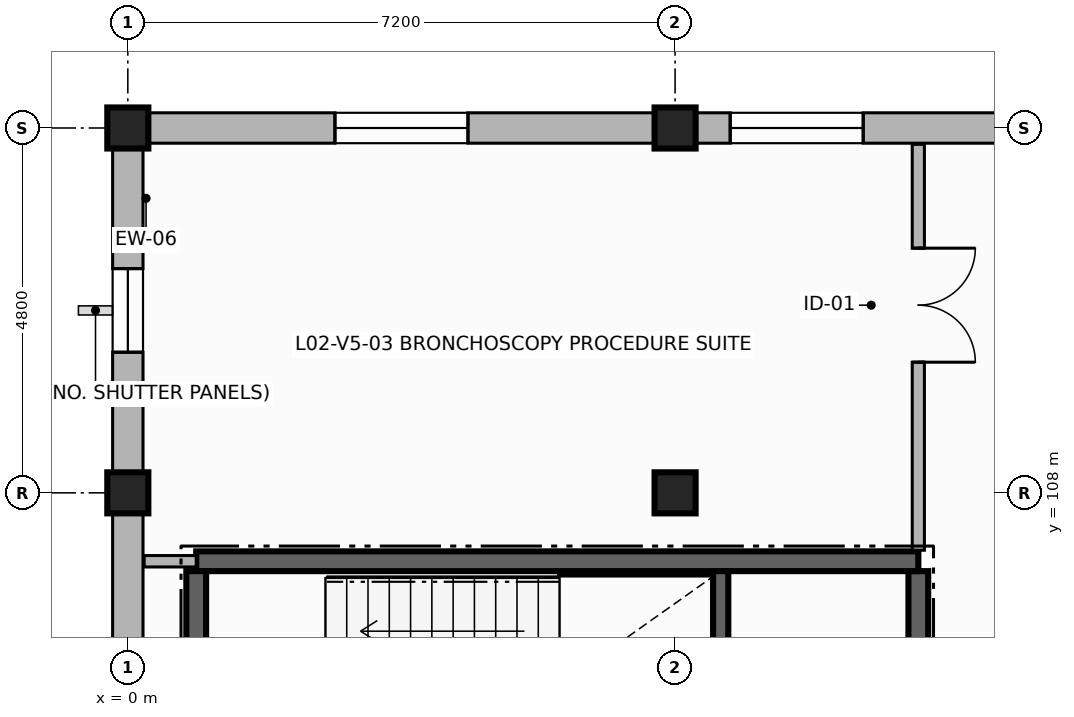
"""IFC4 building model, lengths in metres.
Left out: names, types, materials, properties, quantities, classifications, styles, units other than length and angle.
Written with IfcOpenShell. Run it as: python <this file> out.ifc"""

import sys

from ifc_helpers import new_model, si_unit, direction, frame, frame_2d, origin, origin_2d, place, context, subcontext, project, spatial, rectangle, extrude, element, fill, save


model = new_model("IFC4")
c1 = context("Model", 3, precision=1e-05, world=origin(), true_north=direction((0.0, 1.0)))
c2 = subcontext(c1, "Body", "Model", "MODEL_VIEW")
j1 = project(units=[si_unit("LENGTHUNIT", "METRE"), si_unit("PLANEANGLEUNIT", "RADIAN")], contexts=[c1])
p1 = place(None, origin())
s1 = spatial("IfcSite", under=j1, at=p1, CompositionType="ELEMENT")
p2 = place(p1, origin())
s2 = spatial("IfcBuilding", under=s1, at=p2, CompositionType="ELEMENT")
p3 = place(p2, frame((0.0, 0.0, 8.4)))
s3 = spatial("IfcBuildingStorey", under=s2, at=p3, CompositionType="ELEMENT", Elevation=8.4)
for number, where, z_axis, x_axis in (
    (1, (0.0, 108.0, 0.0), (0.0, 0.0, 1.0), (1.0, 0.0, 0.0)),
    (2, (0.0, 112.8, 0.0), (0.0, 0.0, 1.0), (1.0, 0.0, 0.0)),
    (3, (7.2, 108.0, 0.0), (0.0, 0.0, 1.0), (1.0, 0.0, 0.0)),
    (4, (7.2, 112.8, 0.0), (0.0, 0.0, 1.0), (1.0, 0.0, 0.0)),
):
    element("IfcColumn", number, at=place(p3, frame(where, z_axis=z_axis, x_axis=x_axis)), inside=s3, PredefinedType="COLUMN", context=c2, shape_type="SweptSolid", body=[
        extrude(rectangle(XDim=0.54, YDim=0.54, at=origin_2d()), origin(), (0.0, 0.0, 1.0), 3.59),
    ])
p4 = place(p3, frame((14.4, 112.8, 0.0), z_axis=(0.0, 0.0, 1.0), x_axis=(-1.0, 0.0, 0.0)))
e5 = element("IfcWall", 5, at=p4, inside=s3, PredefinedType="SOLIDWALL", context=c2, shape_type="SweptSolid", body=[
    extrude(rectangle(XDim=7.2, YDim=0.4, at=frame_2d((3.6, 0.0))), origin(), (0.0, 0.0, 1.0), 2.92),
])
p5 = place(p4, frame((4.725, 0.0, 0.9)))
e6 = element("IfcOpeningElement", 6, at=p5, cuts=e5, PredefinedType="OPENING", context=c2, shape_type="SweptSolid", body=[
    extrude(rectangle(XDim=1.75, YDim=1.8, at=frame_2d((0.875, 0.9))), frame((0.0, 0.21, 0.0), z_axis=(0.0, -1.0, 0.0), x_axis=(1.0, 0.0, 0.0)), (0.0, 0.0, 1.0), 0.42),
])
p6 = place(p3, frame((7.2, 112.8, 0.0), z_axis=(0.0, 0.0, 1.0), x_axis=(-1.0, 0.0, 0.0)))
e7 = element("IfcWall", 7, at=p6, inside=s3, PredefinedType="SOLIDWALL", context=c2, shape_type="SweptSolid", body=[
    extrude(rectangle(XDim=7.2, YDim=0.4, at=frame_2d((3.6, 0.0))), origin(), (0.0, 0.0, 1.0), 2.92),
])
p7 = place(p6, frame((2.725, 0.0, 0.9)))
e8 = element("IfcOpeningElement", 8, at=p7, cuts=e7, PredefinedType="OPENING", context=c2, shape_type="SweptSolid", body=[
    extrude(rectangle(XDim=1.75, YDim=1.8, at=frame_2d((0.875, 0.9))), frame((0.0, 0.21, 0.0), z_axis=(0.0, -1.0, 0.0), x_axis=(1.0, 0.0, 0.0)), (0.0, 0.0, 1.0), 0.42),
])
p8 = place(p3, frame((0.0, 112.8, 0.0), z_axis=(0.0, 0.0, 1.0), x_axis=(0.0, -1.0, 0.0)))
e9 = element("IfcWall", 9, at=p8, inside=s3, PredefinedType="SOLIDWALL", context=c2, shape_type="SweptSolid", body=[
    extrude(rectangle(XDim=4.8, YDim=0.4, at=frame_2d((2.4, 0.0))), origin(), (0.0, 0.0, 1.0), 2.92),
])
p9 = place(p8, frame((1.85, 0.0, 0.85)))
e10 = element("IfcOpeningElement", 10, at=p9, cuts=e9, PredefinedType="OPENING", context=c2, shape_type="SweptSolid", body=[
    extrude(rectangle(XDim=1.1, YDim=1.85, at=frame_2d((0.55, 0.925))), frame((0.0, 0.21, 0.0), z_axis=(0.0, -1.0, 0.0), x_axis=(1.0, 0.0, 0.0)), (0.0, 0.0, 1.0), 0.42),
])
p10 = place(p3, frame((0.0, 108.0, 0.0), z_axis=(0.0, 0.0, 1.0), x_axis=(0.0, -1.0, 0.0)))
e11 = element("IfcWall", 11, at=p10, inside=s3, PredefinedType="SOLIDWALL", context=c2, shape_type="SweptSolid", body=[
    extrude(rectangle(XDim=7.2, YDim=0.4, at=frame_2d((3.6, 0.0))), origin(), (0.0, 0.0, 1.0), 2.92),
])
p11 = place(p10, frame((3.025, 0.0, 0.9)))
e12 = element("IfcOpeningElement", 12, at=p11, cuts=e11, PredefinedType="OPENING", context=c2, shape_type="SweptSolid", body=[
    extrude(rectangle(XDim=1.55, YDim=1.8, at=frame_2d((0.775, 0.9))), frame((0.0, 0.21, 0.0), z_axis=(0.0, -1.0, 0.0), x_axis=(1.0, 0.0, 0.0)), (0.0, 0.0, 1.0), 0.42),
])
p12 = place(p3, frame((10.4, 101.43, 0.0), z_axis=(0.0, 0.0, 1.0), x_axis=(0.0, 1.0, 0.0)))
e13 = element("IfcWall", 13, at=p12, inside=s3, PredefinedType="SHEAR", context=c2, shape_type="SweptSolid", body=[
    extrude(rectangle(XDim=5.54, YDim=0.26, at=frame_2d((2.77, 0.0))), origin(), (0.0, 0.0, 1.0), 3.59),
])
p13 = place(p12, frame((0.32, 0.0, 0.0)))
e14 = element("IfcOpeningElement", 14, at=p13, cuts=e13, PredefinedType="OPENING", context=c2, shape_type="SweptSolid", body=[
    extrude(rectangle(XDim=1.15, YDim=2.2, at=frame_2d((0.575, 1.1))), frame((0.0, 0.14, 0.0), z_axis=(0.0, -1.0, 0.0), x_axis=(1.0, 0.0, 0.0)), (0.0, 0.0, 1.0), 0.28),
])
p14 = place(p3, frame((10.4, 107.1, 0.0), z_axis=(0.0, 0.0, 1.0), x_axis=(-1.0, 0.0, 0.0)))
e15 = element("IfcWall", 15, at=p14, inside=s3, PredefinedType="SHEAR", context=c2, shape_type="SweptSolid", body=[
    extrude(rectangle(XDim=9.5, YDim=0.26, at=frame_2d((4.75, 0.0))), origin(), (0.0, 0.0, 1.0), 3.59),
])
p15 = place(p3, frame((0.9, 106.97, 0.0), z_axis=(0.0, 0.0, 1.0), x_axis=(0.0, -1.0, 0.0)))
e16 = element("IfcWall", 16, at=p15, inside=s3, PredefinedType="SHEAR", context=c2, shape_type="SweptSolid", body=[
    extrude(rectangle(XDim=5.54, YDim=0.26, at=frame_2d((2.77, 0.0))), origin(), (0.0, 0.0, 1.0), 3.59),
])
p16 = place(p3, frame((7.8, 103.3, 0.0), z_axis=(0.0, 0.0, 1.0), x_axis=(0.0, 1.0, 0.0)))
e17 = element("IfcWall", 17, at=p16, inside=s3, PredefinedType="SHEAR", context=c2, shape_type="SweptSolid", body=[
    extrude(rectangle(XDim=3.67, YDim=0.2, at=frame_2d((1.835, 0.0))), origin(), (0.0, 0.0, 1.0), 3.59),
])
p17 = place(p3, frame((10.4, 112.585, 0.0), z_axis=(0.0, 0.0, 1.0), x_axis=(0.0, -1.0, 0.0)))
e18 = element("IfcWall", 18, at=p17, inside=s3, PredefinedType="PARTITIONING", context=c2, shape_type="SweptSolid", body=[
    extrude(rectangle(XDim=5.34, YDim=0.16, at=frame_2d((2.67, 0.0))), origin(), (0.0, 0.0, 1.0), 2.9),
])
p18 = place(p17, frame((1.366, 0.0, 0.0)))
e19 = element("IfcOpeningElement", 19, at=p18, cuts=e18, PredefinedType="OPENING", context=c2, shape_type="SweptSolid", body=[
    extrude(rectangle(XDim=1.5, YDim=2.3, at=frame_2d((0.75, 1.15))), frame((0.0, 0.09, 0.0), z_axis=(0.0, -1.0, 0.0), x_axis=(1.0, 0.0, 0.0)), (0.0, 0.0, 1.0), 0.18),
])
p19 = place(p3, frame((0.9, 107.1, 0.0), z_axis=(0.0, 0.0, 1.0), x_axis=(-1.0, 0.0, 0.0)))
e20 = element("IfcWall", 20, at=p19, inside=s3, PredefinedType="PARTITIONING", context=c2, shape_type="SweptSolid", body=[
    extrude(rectangle(XDim=0.685, YDim=0.15, at=frame_2d((0.342, 0.0))), origin(), (0.0, 0.0, 1.0), 2.9),
])
p20 = place(p5, origin())
e21 = element("IfcWindow", 21, at=p20, inside=s3, PartitioningType="SINGLE_PANEL", PredefinedType="WINDOW", context=c2, shape_type="SweptSolid", body=[
    extrude(rectangle(XDim=1.75, YDim=1.8, at=frame_2d((0.875, 0.9))), frame((0.0, 0.03, 0.0), z_axis=(0.0, -1.0, 0.0), x_axis=(1.0, 0.0, 0.0)), (0.0, 0.0, 1.0), 0.06),
])
fill(e6, e21)
p21 = place(p7, origin())
e22 = element("IfcWindow", 22, at=p21, inside=s3, PartitioningType="SINGLE_PANEL", PredefinedType="WINDOW", context=c2, shape_type="SweptSolid", body=[
    extrude(rectangle(XDim=1.75, YDim=1.8, at=frame_2d((0.875, 0.9))), frame((0.0, 0.03, 0.0), z_axis=(0.0, -1.0, 0.0), x_axis=(1.0, 0.0, 0.0)), (0.0, 0.0, 1.0), 0.06),
])
fill(e8, e22)
p22 = place(p9, origin())
e23 = element("IfcWindow", 23, at=p22, inside=s3, PartitioningType="SINGLE_PANEL", PredefinedType="WINDOW", context=c2, shape_type="SweptSolid", body=[
    extrude(rectangle(XDim=1.1, YDim=1.85, at=frame_2d((0.55, 0.925))), frame((0.0, 0.03, 0.0), z_axis=(0.0, -1.0, 0.0), x_axis=(1.0, 0.0, 0.0)), (0.0, 0.0, 1.0), 0.06),
])
fill(e10, e23)
p23 = place(p18, origin())
e24 = element("IfcDoor", 24, at=p23, inside=s3, OperationType="DOUBLE_DOOR_SINGLE_SWING", PredefinedType="DOOR", context=c2, shape_type="SweptSolid", body=[
    extrude(rectangle(XDim=1.5, YDim=2.3, at=frame_2d((0.75, 1.15))), frame((0.0, 0.025, 0.0), z_axis=(0.0, -1.0, 0.0), x_axis=(1.0, 0.0, 0.0)), (0.0, 0.0, 1.0), 0.05),
])
fill(e19, e24)
save(model, sys.argv[1])
